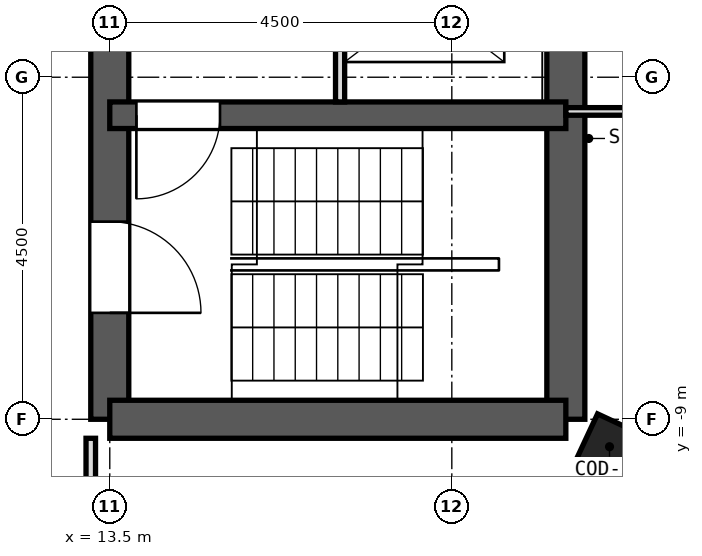
"""IFC4 building model, lengths in metres.
Left out: names, types, materials, properties, quantities, classifications, styles, units other than length and angle.
Written with IfcOpenShell. Run it as: python <this file> out.ifc"""

import sys

from ifc_helpers import new_model, si_unit, direction, frame, frame_2d, origin, origin_2d, place, context, subcontext, project, spatial, polyline, rectangle, outline, extrude, element, fill, save


model = new_model("IFC4")
c1 = context("Model", 3, precision=1e-05, world=origin(), true_north=direction((0.0, 1.0)))
c2 = subcontext(c1, "Body", "Model", "MODEL_VIEW")
j1 = project(units=[si_unit("LENGTHUNIT", "METRE"), si_unit("PLANEANGLEUNIT", "RADIAN")], contexts=[c1])
p1 = place(None, origin())
s1 = spatial("IfcSite", under=j1, at=p1, CompositionType="ELEMENT")
p2 = place(p1, origin())
s2 = spatial("IfcBuilding", under=s1, at=p2, CompositionType="ELEMENT")
p3 = place(p2, frame((0.0, 0.0, 249.5)))
s3 = spatial("IfcBuildingStorey", under=s2, at=p3, CompositionType="ELEMENT", Elevation=249.5)
p4 = place(p3, frame((20.075, -9.361, 0.0), z_axis=(0.0, 0.0, 1.0), x_axis=(0.906307787037, -0.422618261741, 0.0)))
e1 = element("IfcColumn", 1, at=p4, inside=s3, PredefinedType="COLUMN", context=c2, shape_type="SweptSolid", body=[
    extrude(rectangle(XDim=0.65, YDim=0.65, at=origin_2d()), origin(), (0.0, 0.0, 1.0), 3.3),
])
p5 = place(p3, frame((13.5, -9.0, 0.0), z_axis=(0.0, 0.0, 1.0), x_axis=(0.0, 1.0, 0.0)))
e2 = element("IfcWall", 2, at=p5, inside=s3, PredefinedType="SHEAR", context=c2, shape_type="SweptSolid", body=[
    extrude(rectangle(XDim=18.0, YDim=0.5, at=frame_2d((9.0, 0.0))), origin(), (0.0, 0.0, 1.0), 3.3),
])
p6 = place(p5, frame((15.4, 0.0, 0.0)))
e3 = element("IfcOpeningElement", 3, at=p6, cuts=e2, PredefinedType="OPENING", context=c2, shape_type="SweptSolid", body=[
    extrude(rectangle(XDim=1.2, YDim=2.1, at=frame_2d((0.6, 1.05))), frame((0.0, 0.262, 0.0), z_axis=(0.0, -1.0, 0.0), x_axis=(1.0, 0.0, 0.0)), (0.0, 0.0, 1.0), 0.524),
])
p7 = place(p5, frame((1.4, 0.0, 0.0)))
e4 = element("IfcOpeningElement", 4, at=p7, cuts=e2, PredefinedType="OPENING", context=c2, shape_type="SweptSolid", body=[
    extrude(rectangle(XDim=1.2, YDim=2.1, at=frame_2d((0.6, 1.05))), frame((0.0, 0.262, 0.0), z_axis=(0.0, -1.0, 0.0), x_axis=(1.0, 0.0, 0.0)), (0.0, 0.0, 1.0), 0.524),
])
p8 = place(p5, frame((7.5, 0.0, 0.0)))
e5 = element("IfcOpeningElement", 5, at=p8, cuts=e2, PredefinedType="OPENING", context=c2, shape_type="SweptSolid", body=[
    extrude(rectangle(XDim=3.0, YDim=2.4, at=frame_2d((1.5, 1.2))), frame((0.0, 0.262, 0.0), z_axis=(0.0, -1.0, 0.0), x_axis=(1.0, 0.0, 0.0)), (0.0, 0.0, 1.0), 0.524),
])
p9 = place(p3, frame((19.5, -9.0, 0.0), z_axis=(0.0, 0.0, 1.0), x_axis=(0.0, 1.0, 0.0)))
e6 = element("IfcWall", 6, at=p9, inside=s3, PredefinedType="SHEAR", context=c2, shape_type="SweptSolid", body=[
    extrude(rectangle(XDim=18.0, YDim=0.5, at=frame_2d((9.0, 0.0))), origin(), (0.0, 0.0, 1.0), 3.3),
])
p10 = place(p9, frame((9.45, 0.0, 0.0)))
e7 = element("IfcOpeningElement", 7, at=p10, cuts=e6, PredefinedType="OPENING", context=c2, shape_type="SweptSolid", body=[
    extrude(rectangle(XDim=0.9, YDim=2.1, at=frame_2d((0.45, 1.05))), frame((0.0, 0.262, 0.0), z_axis=(0.0, -1.0, 0.0), x_axis=(1.0, 0.0, 0.0)), (0.0, 0.0, 1.0), 0.524),
])
p11 = place(p9, frame((7.65, 0.0, 0.0)))
e8 = element("IfcOpeningElement", 8, at=p11, cuts=e6, PredefinedType="OPENING", context=c2, shape_type="SweptSolid", body=[
    extrude(rectangle(XDim=0.9, YDim=2.1, at=frame_2d((0.45, 1.05))), frame((0.0, 0.262, 0.0), z_axis=(0.0, -1.0, 0.0), x_axis=(1.0, 0.0, 0.0)), (0.0, 0.0, 1.0), 0.524),
])
p12 = place(p3, frame((13.5, -9.0, 0.0), z_axis=(0.0, 0.0, 1.0), x_axis=(1.0, 0.0, 0.0)))
e9 = element("IfcWall", 9, at=p12, inside=s3, PredefinedType="SHEAR", context=c2, shape_type="SweptSolid", body=[
    extrude(rectangle(XDim=6.0, YDim=0.5, at=frame_2d((3.0, 0.0))), origin(), (0.0, 0.0, 1.0), 3.3),
])
p13 = place(p3, frame((13.5, -5.0, 0.0), z_axis=(0.0, 0.0, 1.0), x_axis=(1.0, 0.0, 0.0)))
e10 = element("IfcWall", 10, at=p13, inside=s3, PredefinedType="SHEAR", context=c2, shape_type="SweptSolid", body=[
    extrude(rectangle(XDim=6.0, YDim=0.35, at=frame_2d((3.0, 0.0))), origin(), (0.0, 0.0, 1.0), 3.3),
])
p14 = place(p13, frame((0.35, 0.0, 0.0)))
e11 = element("IfcOpeningElement", 11, at=p14, cuts=e10, PredefinedType="OPENING", context=c2, shape_type="SweptSolid", body=[
    extrude(rectangle(XDim=1.1, YDim=2.1, at=frame_2d((0.55, 1.05))), frame((0.0, 0.187, 0.0), z_axis=(0.0, -1.0, 0.0), x_axis=(1.0, 0.0, 0.0)), (0.0, 0.0, 1.0), 0.374),
])
p15 = place(p3, frame((18.77, -12.714, 0.0), z_axis=(0.0, 0.0, 1.0), x_axis=(0.500014901547, 0.866016800201, 0.0)))
e12 = element("IfcWall", 12, at=p15, inside=s3, PredefinedType="SOLIDWALL", context=c2, shape_type="SweptSolid", body=[
    extrude(rectangle(XDim=3.252, YDim=0.6, at=frame_2d((1.626, 0.0))), origin(), (0.0, 0.0, 1.0), 2.9),
])
p16 = place(p15, frame((0.576, 0.0, 0.9)))
e13 = element("IfcOpeningElement", 13, at=p16, cuts=e12, PredefinedType="OPENING", context=c2, shape_type="SweptSolid", body=[
    extrude(rectangle(XDim=2.1, YDim=1.8, at=frame_2d((1.05, 0.9))), frame((0.0, 0.312, 0.0), z_axis=(0.0, -1.0, 0.0), x_axis=(1.0, 0.0, 0.0)), (0.0, 0.0, 1.0), 0.624),
])
p17 = place(p3, origin())
e14 = element("IfcWall", 14, at=p17, inside=s3, PredefinedType="SOLIDWALL", context=c2, shape_type="SweptSolid", body=[
    extrude(outline(polyline([(20.656, -10.048), (20.975, -9.364), (20.411, -9.159), (20.507, -9.204), (20.232, -9.793), (20.136, -9.748), (20.656, -10.048)])), origin(), (0.0, 0.0, 1.0), 2.9),
])
p18 = place(p3, frame((13.25, -13.175, 0.0), z_axis=(0.0, 0.0, 1.0), x_axis=(0.0, 1.0, 0.0)))
e15 = element("IfcWall", 15, at=p18, inside=s3, PredefinedType="PARTITIONING", context=c2, shape_type="SweptSolid", body=[
    extrude(rectangle(XDim=3.925, YDim=0.125, at=frame_2d((1.962, 0.0))), origin(), (0.0, 0.0, 1.0), 2.9),
])
p19 = place(p18, frame((1.475, 0.0, 0.0)))
e16 = element("IfcOpeningElement", 16, at=p19, cuts=e15, PredefinedType="OPENING", context=c2, shape_type="SweptSolid", body=[
    extrude(rectangle(XDim=0.9, YDim=2.1, at=frame_2d((0.45, 1.05))), frame((0.0, 0.074, 0.0), z_axis=(0.0, -1.0, 0.0), x_axis=(1.0, 0.0, 0.0)), (0.0, 0.0, 1.0), 0.149),
])
p20 = place(p3, frame((19.5, -4.95, 0.0), z_axis=(0.0, 0.0, 1.0), x_axis=(1.0, 0.0, 0.0)))
e17 = element("IfcWall", 17, at=p20, inside=s3, PredefinedType="PARTITIONING", context=c2, shape_type="SweptSolid", body=[
    extrude(rectangle(XDim=2.284, YDim=0.1, at=frame_2d((1.142, 0.0))), origin(), (0.0, 0.0, 1.0), 2.9),
])
p21 = place(p3, frame((16.53, -4.825, 0.0), z_axis=(0.0, 0.0, 1.0), x_axis=(0.0, 1.0, 0.0)))
e18 = element("IfcWall", 18, at=p21, inside=s3, PredefinedType="PARTITIONING", context=c2, shape_type="SweptSolid", body=[
    extrude(rectangle(XDim=2.65, YDim=0.12, at=frame_2d((1.325, 0.0))), origin(), (0.0, 0.0, 1.0), 2.9),
])
p22 = place(p21, frame((0.775, 0.0, 0.0)))
e19 = element("IfcOpeningElement", 19, at=p22, cuts=e18, PredefinedType="OPENING", context=c2, shape_type="SweptSolid", body=[
    extrude(rectangle(XDim=1.1, YDim=2.1, at=frame_2d((0.55, 1.05))), frame((0.0, 0.072, 0.0), z_axis=(0.0, -1.0, 0.0), x_axis=(1.0, 0.0, 0.0)), (0.0, 0.0, 1.0), 0.144),
])
p23 = place(p14, frame((1.1, 0.0, 0.0), z_axis=(0.0, 0.0, 1.0), x_axis=(-1.0, 0.0, 0.0)))
e20 = element("IfcDoor", 20, at=p23, inside=s3, OperationType="SINGLE_SWING_RIGHT", PredefinedType="DOOR", context=c2, shape_type="SweptSolid", body=[
    extrude(rectangle(XDim=1.1, YDim=2.1, at=frame_2d((0.55, 1.05))), frame((0.0, 0.025, 0.0), z_axis=(0.0, -1.0, 0.0), x_axis=(1.0, 0.0, 0.0)), (0.0, 0.0, 1.0), 0.05),
])
fill(e11, e20)
p24 = place(p7, frame((1.2, 0.0, 0.0), z_axis=(0.0, 0.0, 1.0), x_axis=(-1.0, 0.0, 0.0)))
e21 = element("IfcDoor", 21, at=p24, inside=s3, OperationType="SINGLE_SWING_RIGHT", PredefinedType="DOOR", context=c2, shape_type="SweptSolid", body=[
    extrude(rectangle(XDim=1.2, YDim=2.1, at=frame_2d((0.6, 1.05))), frame((0.0, 0.025, 0.0), z_axis=(0.0, -1.0, 0.0), x_axis=(1.0, 0.0, 0.0)), (0.0, 0.0, 1.0), 0.05),
])
fill(e4, e21)
save(model, sys.argv[1])
